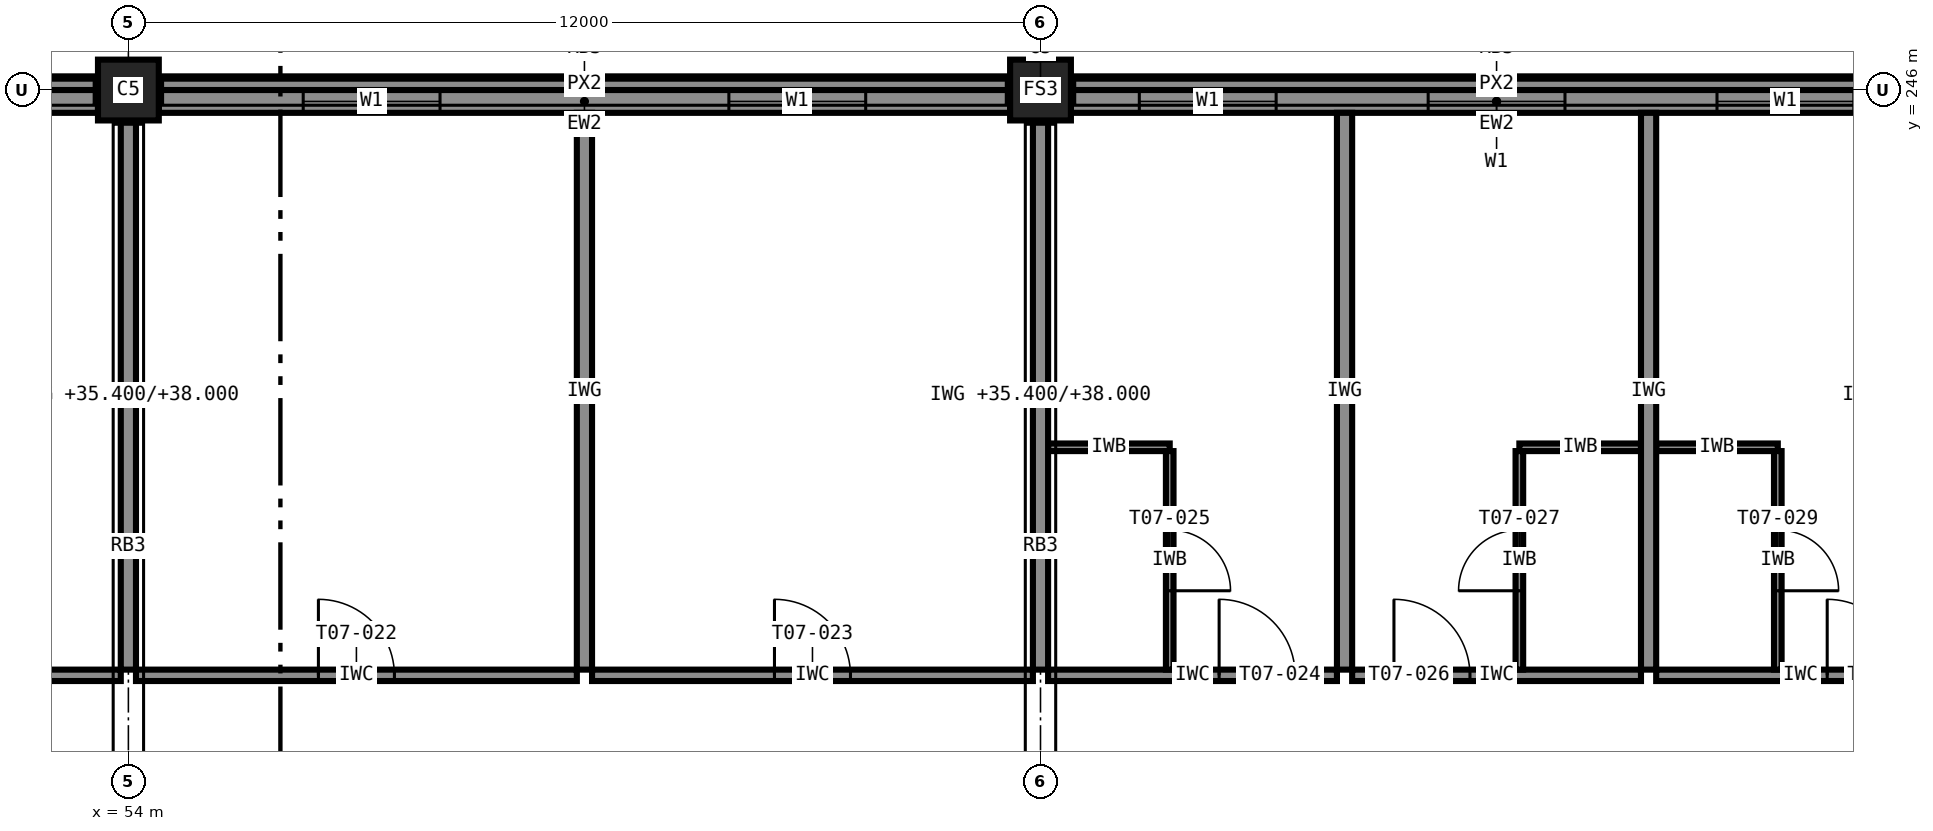
"""IFC4 building model, lengths in metres.
Left out: names, types, materials, properties, quantities, classifications, styles, units other than length and angle.
Written with IfcOpenShell. Run it as: python <this file> out.ifc"""

import sys

from ifc_helpers import new_model, si_unit, direction, frame, frame_2d, origin, origin_2d, place, context, subcontext, project, spatial, rectangle, extrude, element, fill, save


model = new_model("IFC4")
c1 = context("Model", 3, precision=1e-05, world=origin(), true_north=direction((0.0, 1.0)))
c2 = subcontext(c1, "Body", "Model", "MODEL_VIEW")
j1 = project(units=[si_unit("LENGTHUNIT", "METRE"), si_unit("PLANEANGLEUNIT", "RADIAN")], contexts=[c1])
p1 = place(None, origin())
s1 = spatial("IfcSite", under=j1, at=p1, CompositionType="ELEMENT")
p2 = place(p1, origin())
s2 = spatial("IfcBuilding", under=s1, at=p2, CompositionType="ELEMENT")
p3 = place(p2, frame((0.0, 0.0, 35.4)))
s3 = spatial("IfcBuildingStorey", under=s2, at=p3, CompositionType="ELEMENT", Elevation=35.4)
for number, where, z_axis, x_axis in (
    (1, (54.0, 246.0, 0.0), (0.0, 0.0, 1.0), (1.0, 0.0, 0.0)),
    (2, (66.0, 246.0, 0.0), (0.0, 0.0, 1.0), (1.0, 0.0, 0.0)),
):
    element("IfcColumn", number, at=place(p3, frame(where, z_axis=z_axis, x_axis=x_axis)), inside=s3, PredefinedType="COLUMN", context=c2, shape_type="SweptSolid", body=[
        extrude(rectangle(XDim=0.8, YDim=0.8, at=origin_2d()), origin(), (0.0, 0.0, 1.0), 3.6),
    ])
p4 = place(p3, frame((77.6, 245.85, 0.0), z_axis=(0.0, 0.0, 1.0), x_axis=(-1.0, 0.0, 0.0)))
e3 = element("IfcWall", 3, at=p4, inside=s3, PredefinedType="STANDARD", context=c2, shape_type="SweptSolid", body=[
    extrude(rectangle(XDim=11.2, YDim=0.3, at=frame_2d((5.6, 0.0))), origin(), (0.0, 0.0, 1.0), 2.6),
])
p5 = place(p4, frame((8.5, 0.0, 0.85)))
e4 = element("IfcOpeningElement", 4, at=p5, cuts=e3, PredefinedType="OPENING", context=c2, shape_type="SweptSolid", body=[
    extrude(rectangle(XDim=1.8, YDim=1.75, at=frame_2d((0.9, 0.875))), frame((0.0, 0.16, 0.0), z_axis=(0.0, -1.0, 0.0), x_axis=(1.0, 0.0, 0.0)), (0.0, 0.0, 1.0), 0.32),
])
p6 = place(p4, frame((4.7, 0.0, 0.85)))
e5 = element("IfcOpeningElement", 5, at=p6, cuts=e3, PredefinedType="OPENING", context=c2, shape_type="SweptSolid", body=[
    extrude(rectangle(XDim=1.8, YDim=1.75, at=frame_2d((0.9, 0.875))), frame((0.0, 0.16, 0.0), z_axis=(0.0, -1.0, 0.0), x_axis=(1.0, 0.0, 0.0)), (0.0, 0.0, 1.0), 0.32),
])
p7 = place(p4, frame((0.9, 0.0, 0.85)))
e6 = element("IfcOpeningElement", 6, at=p7, cuts=e3, PredefinedType="OPENING", context=c2, shape_type="SweptSolid", body=[
    extrude(rectangle(XDim=1.8, YDim=1.75, at=frame_2d((0.9, 0.875))), frame((0.0, 0.16, 0.0), z_axis=(0.0, -1.0, 0.0), x_axis=(1.0, 0.0, 0.0)), (0.0, 0.0, 1.0), 0.32),
])
p8 = place(p3, frame((65.6, 245.85, 0.0), z_axis=(0.0, 0.0, 1.0), x_axis=(-1.0, 0.0, 0.0)))
e7 = element("IfcWall", 7, at=p8, inside=s3, PredefinedType="STANDARD", context=c2, shape_type="SweptSolid", body=[
    extrude(rectangle(XDim=11.2, YDim=0.3, at=frame_2d((5.6, 0.0))), origin(), (0.0, 0.0, 1.0), 2.6),
])
p9 = place(p8, frame((7.5, 0.0, 0.85)))
e8 = element("IfcOpeningElement", 8, at=p9, cuts=e7, PredefinedType="OPENING", context=c2, shape_type="SweptSolid", body=[
    extrude(rectangle(XDim=1.8, YDim=1.75, at=frame_2d((0.9, 0.875))), frame((0.0, 0.16, 0.0), z_axis=(0.0, -1.0, 0.0), x_axis=(1.0, 0.0, 0.0)), (0.0, 0.0, 1.0), 0.32),
])
p10 = place(p8, frame((1.9, 0.0, 0.85)))
e9 = element("IfcOpeningElement", 9, at=p10, cuts=e7, PredefinedType="OPENING", context=c2, shape_type="SweptSolid", body=[
    extrude(rectangle(XDim=1.8, YDim=1.75, at=frame_2d((0.9, 0.875))), frame((0.0, 0.16, 0.0), z_axis=(0.0, -1.0, 0.0), x_axis=(1.0, 0.0, 0.0)), (0.0, 0.0, 1.0), 0.32),
])
p11 = place(p3, frame((53.6, 245.85, 0.0), z_axis=(0.0, 0.0, 1.0), x_axis=(-1.0, 0.0, 0.0)))
e10 = element("IfcWall", 10, at=p11, inside=s3, PredefinedType="STANDARD", context=c2, shape_type="SweptSolid", body=[
    extrude(rectangle(XDim=11.2, YDim=0.3, at=frame_2d((5.6, 0.0))), origin(), (0.0, 0.0, 1.0), 2.6),
])
p12 = place(p11, frame((1.0, 0.0, 0.85)))
e11 = element("IfcOpeningElement", 11, at=p12, cuts=e10, PredefinedType="OPENING", context=c2, shape_type="SweptSolid", body=[
    extrude(rectangle(XDim=1.8, YDim=1.75, at=frame_2d((0.9, 0.875))), frame((0.0, 0.16, 0.0), z_axis=(0.0, -1.0, 0.0), x_axis=(1.0, 0.0, 0.0)), (0.0, 0.0, 1.0), 0.32),
])
p13 = place(p11, frame((4.8, 0.0, 0.85)))
e12 = element("IfcOpeningElement", 12, at=p13, cuts=e10, PredefinedType="OPENING", context=c2, shape_type="SweptSolid", body=[
    extrude(rectangle(XDim=1.8, YDim=1.75, at=frame_2d((0.9, 0.875))), frame((0.0, 0.16, 0.0), z_axis=(0.0, -1.0, 0.0), x_axis=(1.0, 0.0, 0.0)), (0.0, 0.0, 1.0), 0.32),
])
for number, where, z_axis, x_axis in (
    (13, (77.6, 246.075, 3.4), (0.0, 0.0, 1.0), (-1.0, 0.0, 0.0)),
    (14, (65.6, 246.075, 3.4), (0.0, 0.0, 1.0), (-1.0, 0.0, 0.0)),
    (15, (53.6, 246.075, 3.4), (0.0, 0.0, 1.0), (-1.0, 0.0, 0.0)),
):
    element("IfcWall", number, at=place(p3, frame(where, z_axis=z_axis, x_axis=x_axis)), inside=s3, PredefinedType="STANDARD", context=c2, shape_type="SweptSolid", body=[
        extrude(rectangle(XDim=11.2, YDim=0.15, at=frame_2d((5.6, 0.0))), origin(), (0.0, 0.0, 1.0), 0.2),
    ])
p14 = place(p3, frame((46.0, 238.3, 0.0), z_axis=(0.0, 0.0, 1.0), x_axis=(1.0, 0.0, 0.0)))
e16 = element("IfcWall", 16, at=p14, inside=s3, PredefinedType="PARTITIONING", context=c2, shape_type="SweptSolid", body=[
    extrude(rectangle(XDim=7.9, YDim=0.15, at=frame_2d((3.95, 0.0))), origin(), (0.0, 0.0, 1.0), 3.4),
])
p15 = place(p14, frame((3.5, 0.0, 0.0)))
e17 = element("IfcOpeningElement", 17, at=p15, cuts=e16, PredefinedType="OPENING", context=c2, shape_type="SweptSolid", body=[
    extrude(rectangle(XDim=1.0, YDim=2.1, at=frame_2d((0.5, 1.05))), frame((0.0, 0.085, 0.0), z_axis=(0.0, -1.0, 0.0), x_axis=(1.0, 0.0, 0.0)), (0.0, 0.0, 1.0), 0.17),
])
p16 = place(p3, frame((54.1, 238.3, 0.0), z_axis=(0.0, 0.0, 1.0), x_axis=(1.0, 0.0, 0.0)))
e18 = element("IfcWall", 18, at=p16, inside=s3, PredefinedType="PARTITIONING", context=c2, shape_type="SweptSolid", body=[
    extrude(rectangle(XDim=5.8, YDim=0.15, at=frame_2d((2.9, 0.0))), origin(), (0.0, 0.0, 1.0), 3.4),
])
p17 = place(p16, frame((2.4, 0.0, 0.0)))
e19 = element("IfcOpeningElement", 19, at=p17, cuts=e18, PredefinedType="OPENING", context=c2, shape_type="SweptSolid", body=[
    extrude(rectangle(XDim=1.0, YDim=2.1, at=frame_2d((0.5, 1.05))), frame((0.0, 0.085, 0.0), z_axis=(0.0, -1.0, 0.0), x_axis=(1.0, 0.0, 0.0)), (0.0, 0.0, 1.0), 0.17),
])
p18 = place(p3, frame((60.1, 238.3, 0.0), z_axis=(0.0, 0.0, 1.0), x_axis=(1.0, 0.0, 0.0)))
e20 = element("IfcWall", 20, at=p18, inside=s3, PredefinedType="PARTITIONING", context=c2, shape_type="SweptSolid", body=[
    extrude(rectangle(XDim=5.8, YDim=0.15, at=frame_2d((2.9, 0.0))), origin(), (0.0, 0.0, 1.0), 3.4),
])
p19 = place(p18, frame((2.4, 0.0, 0.0)))
e21 = element("IfcOpeningElement", 21, at=p19, cuts=e20, PredefinedType="OPENING", context=c2, shape_type="SweptSolid", body=[
    extrude(rectangle(XDim=1.0, YDim=2.1, at=frame_2d((0.5, 1.05))), frame((0.0, 0.085, 0.0), z_axis=(0.0, -1.0, 0.0), x_axis=(1.0, 0.0, 0.0)), (0.0, 0.0, 1.0), 0.17),
])
p20 = place(p3, frame((66.1, 238.3, 0.0), z_axis=(0.0, 0.0, 1.0), x_axis=(1.0, 0.0, 0.0)))
e22 = element("IfcWall", 22, at=p20, inside=s3, PredefinedType="PARTITIONING", context=c2, shape_type="SweptSolid", body=[
    extrude(rectangle(XDim=3.8, YDim=0.15, at=frame_2d((1.9, 0.0))), origin(), (0.0, 0.0, 1.0), 3.4),
])
p21 = place(p20, frame((2.25, 0.0, 0.0)))
e23 = element("IfcOpeningElement", 23, at=p21, cuts=e22, PredefinedType="OPENING", context=c2, shape_type="SweptSolid", body=[
    extrude(rectangle(XDim=1.0, YDim=2.1, at=frame_2d((0.5, 1.05))), frame((0.0, 0.085, 0.0), z_axis=(0.0, -1.0, 0.0), x_axis=(1.0, 0.0, 0.0)), (0.0, 0.0, 1.0), 0.17),
])
p22 = place(p3, frame((66.1, 241.3, 0.0), z_axis=(0.0, 0.0, 1.0), x_axis=(1.0, 0.0, 0.0)))
e24 = element("IfcWall", 24, at=p22, inside=s3, PredefinedType="PARTITIONING", context=c2, shape_type="SweptSolid", body=[
    extrude(rectangle(XDim=1.6, YDim=0.1, at=frame_2d((0.8, 0.0))), origin(), (0.0, 0.0, 1.0), 3.4),
])
p23 = place(p3, frame((67.7, 241.25, 0.0), z_axis=(0.0, 0.0, 1.0), x_axis=(0.0, -1.0, 0.0)))
e25 = element("IfcWall", 25, at=p23, inside=s3, PredefinedType="PARTITIONING", context=c2, shape_type="SweptSolid", body=[
    extrude(rectangle(XDim=2.875, YDim=0.1, at=frame_2d((1.438, 0.0))), origin(), (0.0, 0.0, 1.0), 3.4),
])
p24 = place(p23, frame((1.038, 0.0, 0.0)))
e26 = element("IfcOpeningElement", 26, at=p24, cuts=e25, PredefinedType="OPENING", context=c2, shape_type="SweptSolid", body=[
    extrude(rectangle(XDim=0.8, YDim=2.1, at=frame_2d((0.4, 1.05))), frame((0.0, 0.06, 0.0), z_axis=(0.0, -1.0, 0.0), x_axis=(1.0, 0.0, 0.0)), (0.0, 0.0, 1.0), 0.12),
])
p25 = place(p3, frame((70.1, 238.3, 0.0), z_axis=(0.0, 0.0, 1.0), x_axis=(1.0, 0.0, 0.0)))
e27 = element("IfcWall", 27, at=p25, inside=s3, PredefinedType="PARTITIONING", context=c2, shape_type="SweptSolid", body=[
    extrude(rectangle(XDim=3.8, YDim=0.15, at=frame_2d((1.9, 0.0))), origin(), (0.0, 0.0, 1.0), 3.4),
])
p26 = place(p25, frame((0.55, 0.0, 0.0)))
e28 = element("IfcOpeningElement", 28, at=p26, cuts=e27, PredefinedType="OPENING", context=c2, shape_type="SweptSolid", body=[
    extrude(rectangle(XDim=1.0, YDim=2.1, at=frame_2d((0.5, 1.05))), frame((0.0, 0.085, 0.0), z_axis=(0.0, -1.0, 0.0), x_axis=(1.0, 0.0, 0.0)), (0.0, 0.0, 1.0), 0.17),
])
p27 = place(p3, frame((72.3, 241.3, 0.0), z_axis=(0.0, 0.0, 1.0), x_axis=(1.0, 0.0, 0.0)))
e29 = element("IfcWall", 29, at=p27, inside=s3, PredefinedType="PARTITIONING", context=c2, shape_type="SweptSolid", body=[
    extrude(rectangle(XDim=1.6, YDim=0.1, at=frame_2d((0.8, 0.0))), origin(), (0.0, 0.0, 1.0), 3.4),
])
p28 = place(p3, frame((72.3, 238.375, 0.0), z_axis=(0.0, 0.0, 1.0), x_axis=(0.0, 1.0, 0.0)))
e30 = element("IfcWall", 30, at=p28, inside=s3, PredefinedType="PARTITIONING", context=c2, shape_type="SweptSolid", body=[
    extrude(rectangle(XDim=2.875, YDim=0.1, at=frame_2d((1.438, 0.0))), origin(), (0.0, 0.0, 1.0), 3.4),
])
p29 = place(p28, frame((1.038, 0.0, 0.0)))
e31 = element("IfcOpeningElement", 31, at=p29, cuts=e30, PredefinedType="OPENING", context=c2, shape_type="SweptSolid", body=[
    extrude(rectangle(XDim=0.8, YDim=2.1, at=frame_2d((0.4, 1.05))), frame((0.0, 0.06, 0.0), z_axis=(0.0, -1.0, 0.0), x_axis=(1.0, 0.0, 0.0)), (0.0, 0.0, 1.0), 0.12),
])
p30 = place(p3, frame((74.1, 238.3, 0.0), z_axis=(0.0, 0.0, 1.0), x_axis=(1.0, 0.0, 0.0)))
e32 = element("IfcWall", 32, at=p30, inside=s3, PredefinedType="PARTITIONING", context=c2, shape_type="SweptSolid", body=[
    extrude(rectangle(XDim=3.8, YDim=0.15, at=frame_2d((1.9, 0.0))), origin(), (0.0, 0.0, 1.0), 3.4),
])
p31 = place(p30, frame((2.25, 0.0, 0.0)))
e33 = element("IfcOpeningElement", 33, at=p31, cuts=e32, PredefinedType="OPENING", context=c2, shape_type="SweptSolid", body=[
    extrude(rectangle(XDim=1.0, YDim=2.1, at=frame_2d((0.5, 1.05))), frame((0.0, 0.085, 0.0), z_axis=(0.0, -1.0, 0.0), x_axis=(1.0, 0.0, 0.0)), (0.0, 0.0, 1.0), 0.17),
])
p32 = place(p3, frame((74.1, 241.3, 0.0), z_axis=(0.0, 0.0, 1.0), x_axis=(1.0, 0.0, 0.0)))
e34 = element("IfcWall", 34, at=p32, inside=s3, PredefinedType="PARTITIONING", context=c2, shape_type="SweptSolid", body=[
    extrude(rectangle(XDim=1.6, YDim=0.1, at=frame_2d((0.8, 0.0))), origin(), (0.0, 0.0, 1.0), 3.4),
])
p33 = place(p3, frame((75.7, 241.25, 0.0), z_axis=(0.0, 0.0, 1.0), x_axis=(0.0, -1.0, 0.0)))
e35 = element("IfcWall", 35, at=p33, inside=s3, PredefinedType="PARTITIONING", context=c2, shape_type="SweptSolid", body=[
    extrude(rectangle(XDim=2.875, YDim=0.1, at=frame_2d((1.438, 0.0))), origin(), (0.0, 0.0, 1.0), 3.4),
])
p34 = place(p33, frame((1.038, 0.0, 0.0)))
e36 = element("IfcOpeningElement", 36, at=p34, cuts=e35, PredefinedType="OPENING", context=c2, shape_type="SweptSolid", body=[
    extrude(rectangle(XDim=0.8, YDim=2.1, at=frame_2d((0.4, 1.05))), frame((0.0, 0.06, 0.0), z_axis=(0.0, -1.0, 0.0), x_axis=(1.0, 0.0, 0.0)), (0.0, 0.0, 1.0), 0.12),
])
p35 = place(p3, frame((54.0, 245.6, 0.0), z_axis=(0.0, 0.0, 1.0), x_axis=(0.0, -1.0, 0.0)))
e37 = element("IfcWall", 37, at=p35, inside=s3, PredefinedType="PARTITIONING", context=c2, shape_type="SweptSolid", body=[
    extrude(rectangle(XDim=7.225, YDim=0.2, at=frame_2d((3.613, 0.0))), origin(), (0.0, 0.0, 1.0), 2.6),
])
p36 = place(p3, frame((60.0, 245.7, 0.0), z_axis=(0.0, 0.0, 1.0), x_axis=(0.0, -1.0, 0.0)))
e38 = element("IfcWall", 38, at=p36, inside=s3, PredefinedType="PARTITIONING", context=c2, shape_type="SweptSolid", body=[
    extrude(rectangle(XDim=7.325, YDim=0.2, at=frame_2d((3.663, 0.0))), origin(), (0.0, 0.0, 1.0), 3.4),
])
p37 = place(p3, frame((66.0, 245.6, 0.0), z_axis=(0.0, 0.0, 1.0), x_axis=(0.0, -1.0, 0.0)))
e39 = element("IfcWall", 39, at=p37, inside=s3, PredefinedType="PARTITIONING", context=c2, shape_type="SweptSolid", body=[
    extrude(rectangle(XDim=7.225, YDim=0.2, at=frame_2d((3.613, 0.0))), origin(), (0.0, 0.0, 1.0), 2.6),
])
for number, where, z_axis, x_axis in (
    (40, (70.0, 245.7, 0.0), (0.0, 0.0, 1.0), (0.0, -1.0, 0.0)),
    (41, (74.0, 245.7, 0.0), (0.0, 0.0, 1.0), (0.0, -1.0, 0.0)),
):
    element("IfcWall", number, at=place(p3, frame(where, z_axis=z_axis, x_axis=x_axis)), inside=s3, PredefinedType="PARTITIONING", context=c2, shape_type="SweptSolid", body=[
        extrude(rectangle(XDim=7.325, YDim=0.2, at=frame_2d((3.663, 0.0))), origin(), (0.0, 0.0, 1.0), 3.4),
    ])
p38 = place(p5, origin())
e42 = element("IfcWindow", 42, at=p38, inside=s3, PartitioningType="SINGLE_PANEL", PredefinedType="WINDOW", context=c2, shape_type="SweptSolid", body=[
    extrude(rectangle(XDim=1.8, YDim=1.75, at=frame_2d((0.9, 0.875))), frame((0.0, 0.03, 0.0), z_axis=(0.0, -1.0, 0.0), x_axis=(1.0, 0.0, 0.0)), (0.0, 0.0, 1.0), 0.06),
])
fill(e4, e42)
p39 = place(p6, origin())
e43 = element("IfcWindow", 43, at=p39, inside=s3, PartitioningType="SINGLE_PANEL", PredefinedType="WINDOW", context=c2, shape_type="SweptSolid", body=[
    extrude(rectangle(XDim=1.8, YDim=1.75, at=frame_2d((0.9, 0.875))), frame((0.0, 0.03, 0.0), z_axis=(0.0, -1.0, 0.0), x_axis=(1.0, 0.0, 0.0)), (0.0, 0.0, 1.0), 0.06),
])
fill(e5, e43)
p40 = place(p7, origin())
e44 = element("IfcWindow", 44, at=p40, inside=s3, PartitioningType="SINGLE_PANEL", PredefinedType="WINDOW", context=c2, shape_type="SweptSolid", body=[
    extrude(rectangle(XDim=1.8, YDim=1.75, at=frame_2d((0.9, 0.875))), frame((0.0, 0.03, 0.0), z_axis=(0.0, -1.0, 0.0), x_axis=(1.0, 0.0, 0.0)), (0.0, 0.0, 1.0), 0.06),
])
fill(e6, e44)
p41 = place(p9, origin())
e45 = element("IfcWindow", 45, at=p41, inside=s3, PartitioningType="SINGLE_PANEL", PredefinedType="WINDOW", context=c2, shape_type="SweptSolid", body=[
    extrude(rectangle(XDim=1.8, YDim=1.75, at=frame_2d((0.9, 0.875))), frame((0.0, 0.03, 0.0), z_axis=(0.0, -1.0, 0.0), x_axis=(1.0, 0.0, 0.0)), (0.0, 0.0, 1.0), 0.06),
])
fill(e8, e45)
p42 = place(p10, origin())
e46 = element("IfcWindow", 46, at=p42, inside=s3, PartitioningType="SINGLE_PANEL", PredefinedType="WINDOW", context=c2, shape_type="SweptSolid", body=[
    extrude(rectangle(XDim=1.8, YDim=1.75, at=frame_2d((0.9, 0.875))), frame((0.0, 0.03, 0.0), z_axis=(0.0, -1.0, 0.0), x_axis=(1.0, 0.0, 0.0)), (0.0, 0.0, 1.0), 0.06),
])
fill(e9, e46)
p43 = place(p17, origin())
e47 = element("IfcDoor", 47, at=p43, inside=s3, OperationType="SINGLE_SWING_LEFT", PredefinedType="DOOR", context=c2, shape_type="SweptSolid", body=[
    extrude(rectangle(XDim=1.0, YDim=2.1, at=frame_2d((0.5, 1.05))), frame((0.0, 0.025, 0.0), z_axis=(0.0, -1.0, 0.0), x_axis=(1.0, 0.0, 0.0)), (0.0, 0.0, 1.0), 0.05),
])
fill(e19, e47)
p44 = place(p19, origin())
e48 = element("IfcDoor", 48, at=p44, inside=s3, OperationType="SINGLE_SWING_LEFT", PredefinedType="DOOR", context=c2, shape_type="SweptSolid", body=[
    extrude(rectangle(XDim=1.0, YDim=2.1, at=frame_2d((0.5, 1.05))), frame((0.0, 0.025, 0.0), z_axis=(0.0, -1.0, 0.0), x_axis=(1.0, 0.0, 0.0)), (0.0, 0.0, 1.0), 0.05),
])
fill(e21, e48)
p45 = place(p21, origin())
e49 = element("IfcDoor", 49, at=p45, inside=s3, OperationType="SINGLE_SWING_LEFT", PredefinedType="DOOR", context=c2, shape_type="SweptSolid", body=[
    extrude(rectangle(XDim=1.0, YDim=2.1, at=frame_2d((0.5, 1.05))), frame((0.0, 0.025, 0.0), z_axis=(0.0, -1.0, 0.0), x_axis=(1.0, 0.0, 0.0)), (0.0, 0.0, 1.0), 0.05),
])
fill(e23, e49)
p46 = place(p24, origin())
e50 = element("IfcDoor", 50, at=p46, inside=s3, OperationType="SINGLE_SWING_RIGHT", PredefinedType="DOOR", context=c2, shape_type="SweptSolid", body=[
    extrude(rectangle(XDim=0.8, YDim=2.1, at=frame_2d((0.4, 1.05))), frame((0.0, 0.025, 0.0), z_axis=(0.0, -1.0, 0.0), x_axis=(1.0, 0.0, 0.0)), (0.0, 0.0, 1.0), 0.05),
])
fill(e26, e50)
p47 = place(p26, origin())
e51 = element("IfcDoor", 51, at=p47, inside=s3, OperationType="SINGLE_SWING_LEFT", PredefinedType="DOOR", context=c2, shape_type="SweptSolid", body=[
    extrude(rectangle(XDim=1.0, YDim=2.1, at=frame_2d((0.5, 1.05))), frame((0.0, 0.025, 0.0), z_axis=(0.0, -1.0, 0.0), x_axis=(1.0, 0.0, 0.0)), (0.0, 0.0, 1.0), 0.05),
])
fill(e28, e51)
p48 = place(p29, origin())
e52 = element("IfcDoor", 52, at=p48, inside=s3, OperationType="SINGLE_SWING_LEFT", PredefinedType="DOOR", context=c2, shape_type="SweptSolid", body=[
    extrude(rectangle(XDim=0.8, YDim=2.1, at=frame_2d((0.4, 1.05))), frame((0.0, 0.025, 0.0), z_axis=(0.0, -1.0, 0.0), x_axis=(1.0, 0.0, 0.0)), (0.0, 0.0, 1.0), 0.05),
])
fill(e31, e52)
p49 = place(p31, origin())
e53 = element("IfcDoor", 53, at=p49, inside=s3, OperationType="SINGLE_SWING_LEFT", PredefinedType="DOOR", context=c2, shape_type="SweptSolid", body=[
    extrude(rectangle(XDim=1.0, YDim=2.1, at=frame_2d((0.5, 1.05))), frame((0.0, 0.025, 0.0), z_axis=(0.0, -1.0, 0.0), x_axis=(1.0, 0.0, 0.0)), (0.0, 0.0, 1.0), 0.05),
])
fill(e33, e53)
p50 = place(p34, origin())
e54 = element("IfcDoor", 54, at=p50, inside=s3, OperationType="SINGLE_SWING_RIGHT", PredefinedType="DOOR", context=c2, shape_type="SweptSolid", body=[
    extrude(rectangle(XDim=0.8, YDim=2.1, at=frame_2d((0.4, 1.05))), frame((0.0, 0.025, 0.0), z_axis=(0.0, -1.0, 0.0), x_axis=(1.0, 0.0, 0.0)), (0.0, 0.0, 1.0), 0.05),
])
fill(e36, e54)
save(model, sys.argv[1])
